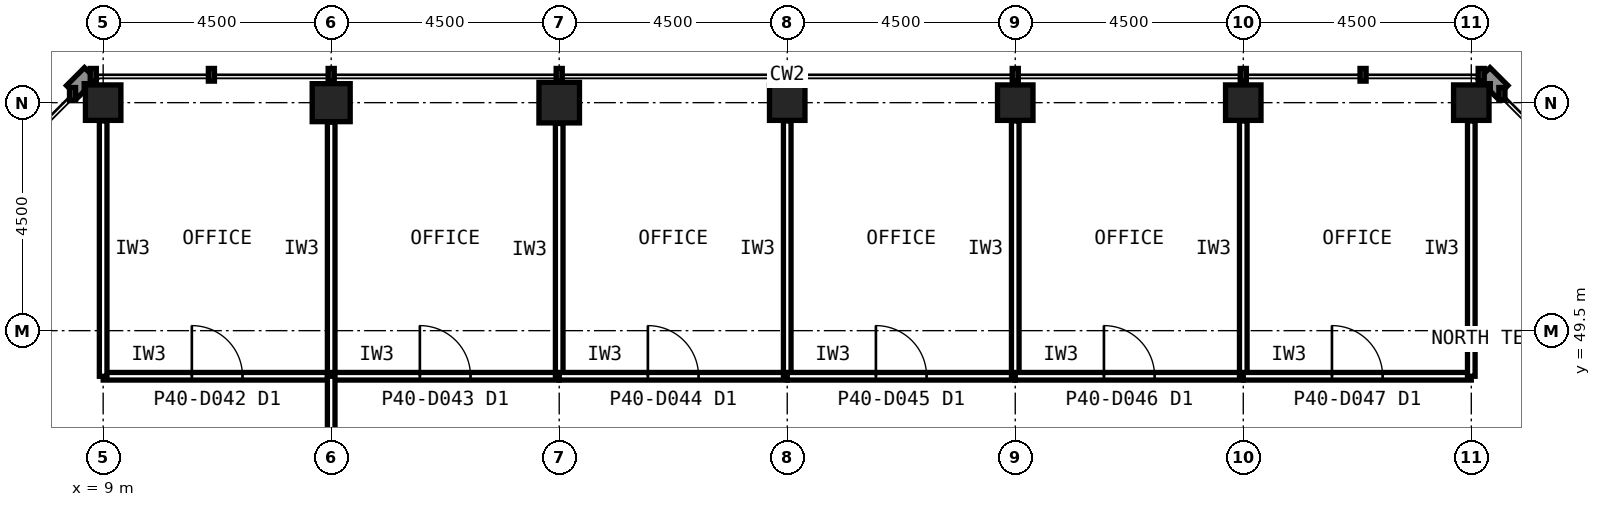
"""IFC4 building model, lengths in metres.
Left out: names, types, materials, properties, quantities, classifications, styles, units other than length and angle.
Written with IfcOpenShell. Run it as: python <this file> out.ifc"""

import sys

from ifc_helpers import new_model, si_unit, direction, frame, frame_2d, origin, origin_2d, place, context, subcontext, project, spatial, rectangle, hollow_rectangle, extrude, element, fill, save


model = new_model("IFC4")
c1 = context("Model", 3, precision=1e-05, world=origin(), true_north=direction((0.0, 1.0)))
c2 = subcontext(c1, "Body", "Model", "MODEL_VIEW")
j1 = project(units=[si_unit("LENGTHUNIT", "METRE"), si_unit("PLANEANGLEUNIT", "RADIAN")], contexts=[c1])
p1 = place(None, origin())
s1 = spatial("IfcSite", under=j1, at=p1, CompositionType="ELEMENT")
p2 = place(p1, origin())
s2 = spatial("IfcBuilding", under=s1, at=p2, CompositionType="ELEMENT")
p3 = place(p2, frame((0.0, 0.0, 167.6)))
s3 = spatial("IfcBuildingStorey", under=s2, at=p3, CompositionType="ELEMENT", Elevation=167.6)
for number, where, z_axis, x_axis in (
    (1, (36.0, 54.0, 0.0), (0.0, 0.0, 1.0), (1.0, 0.0, 0.0)),
    (2, (31.5, 54.0, 0.0), (0.0, 0.0, 1.0), (1.0, 0.0, 0.0)),
    (3, (27.0, 54.0, 0.0), (0.0, 0.0, 1.0), (1.0, 0.0, 0.0)),
    (4, (22.5, 54.0, 0.0), (0.0, 0.0, 1.0), (1.0, 0.0, 0.0)),
):
    element("IfcColumn", number, at=place(p3, frame(where, z_axis=z_axis, x_axis=x_axis)), inside=s3, PredefinedType="COLUMN", context=c2, shape_type="SweptSolid", body=[
        extrude(hollow_rectangle(XDim=0.7, YDim=0.7, WallThickness=0.036, at=origin_2d()), origin(), (0.0, 0.0, 1.0), 4.0),
    ])
p4 = place(p3, frame((18.0, 54.0, 0.0), z_axis=(0.0, 0.0, 1.0), x_axis=(1.0, 0.0, 0.0)))
e5 = element("IfcColumn", 5, at=p4, inside=s3, PredefinedType="COLUMN", context=c2, shape_type="SweptSolid", body=[
    extrude(hollow_rectangle(XDim=0.8, YDim=0.8, WallThickness=0.045, at=origin_2d()), origin(), (0.0, 0.0, 1.0), 4.0),
])
p5 = place(p3, frame((13.5, 54.0, 0.0), z_axis=(0.0, 0.0, 1.0), x_axis=(1.0, 0.0, 0.0)))
e6 = element("IfcColumn", 6, at=p5, inside=s3, PredefinedType="COLUMN", context=c2, shape_type="SweptSolid", body=[
    extrude(hollow_rectangle(XDim=0.75, YDim=0.75, WallThickness=0.04, at=origin_2d()), origin(), (0.0, 0.0, 1.0), 4.0),
])
p6 = place(p3, frame((9.0, 54.0, 0.0), z_axis=(0.0, 0.0, 1.0), x_axis=(1.0, 0.0, 0.0)))
e7 = element("IfcColumn", 7, at=p6, inside=s3, PredefinedType="COLUMN", context=c2, shape_type="SweptSolid", body=[
    extrude(hollow_rectangle(XDim=0.7, YDim=0.7, WallThickness=0.036, at=origin_2d()), origin(), (0.0, 0.0, 1.0), 4.0),
])
p7 = place(p3, frame((9.0, 48.6, 0.0), z_axis=(0.0, 0.0, 1.0), x_axis=(1.0, 0.0, 0.0)))
e8 = element("IfcWall", 8, at=p7, inside=s3, PredefinedType="PARTITIONING", context=c2, shape_type="SweptSolid", body=[
    extrude(rectangle(XDim=4.5, YDim=0.15, at=frame_2d((2.25, 0.0))), origin(), (0.0, 0.0, 1.0), 3.84),
])
p8 = place(p7, frame((1.75, 0.0, 0.0)))
e9 = element("IfcOpeningElement", 9, at=p8, cuts=e8, PredefinedType="OPENING", context=c2, shape_type="SweptSolid", body=[
    extrude(rectangle(XDim=1.0, YDim=2.1, at=frame_2d((0.5, 1.05))), frame((0.0, 0.085, 0.0), z_axis=(0.0, -1.0, 0.0), x_axis=(1.0, 0.0, 0.0)), (0.0, 0.0, 1.0), 0.17),
])
p9 = place(p3, frame((13.5, 48.6, 0.0), z_axis=(0.0, 0.0, 1.0), x_axis=(0.0, 1.0, 0.0)))
e10 = element("IfcWall", 10, at=p9, inside=s3, PredefinedType="PARTITIONING", context=c2, shape_type="SweptSolid", body=[
    extrude(rectangle(XDim=5.015, YDim=0.15, at=frame_2d((2.507, 0.0))), origin(), (0.0, 0.0, 1.0), 2.989),
])
p10 = place(p3, frame((9.0, 53.64, 0.0), z_axis=(0.0, 0.0, 1.0), x_axis=(0.0, -1.0, 0.0)))
e11 = element("IfcWall", 11, at=p10, inside=s3, PredefinedType="PARTITIONING", context=c2, shape_type="SweptSolid", body=[
    extrude(rectangle(XDim=5.04, YDim=0.15, at=frame_2d((2.52, 0.0))), origin(), (0.0, 0.0, 1.0), 3.229),
])
p11 = place(p3, frame((13.5, 48.6, 0.0), z_axis=(0.0, 0.0, 1.0), x_axis=(1.0, 0.0, 0.0)))
e12 = element("IfcWall", 12, at=p11, inside=s3, PredefinedType="PARTITIONING", context=c2, shape_type="SweptSolid", body=[
    extrude(rectangle(XDim=4.5, YDim=0.15, at=frame_2d((2.25, 0.0))), origin(), (0.0, 0.0, 1.0), 3.84),
])
p12 = place(p11, frame((1.75, 0.0, 0.0)))
e13 = element("IfcOpeningElement", 13, at=p12, cuts=e12, PredefinedType="OPENING", context=c2, shape_type="SweptSolid", body=[
    extrude(rectangle(XDim=1.0, YDim=2.1, at=frame_2d((0.5, 1.05))), frame((0.0, 0.085, 0.0), z_axis=(0.0, -1.0, 0.0), x_axis=(1.0, 0.0, 0.0)), (0.0, 0.0, 1.0), 0.17),
])
p13 = place(p3, frame((18.0, 48.6, 0.0), z_axis=(0.0, 0.0, 1.0), x_axis=(0.0, 1.0, 0.0)))
e14 = element("IfcWall", 14, at=p13, inside=s3, PredefinedType="PARTITIONING", context=c2, shape_type="SweptSolid", body=[
    extrude(rectangle(XDim=4.99, YDim=0.15, at=frame_2d((2.495, 0.0))), origin(), (0.0, 0.0, 1.0), 2.989),
])
p14 = place(p3, frame((18.0, 48.6, 0.0), z_axis=(0.0, 0.0, 1.0), x_axis=(1.0, 0.0, 0.0)))
e15 = element("IfcWall", 15, at=p14, inside=s3, PredefinedType="PARTITIONING", context=c2, shape_type="SweptSolid", body=[
    extrude(rectangle(XDim=4.5, YDim=0.15, at=frame_2d((2.25, 0.0))), origin(), (0.0, 0.0, 1.0), 3.84),
])
p15 = place(p14, frame((1.75, 0.0, 0.0)))
e16 = element("IfcOpeningElement", 16, at=p15, cuts=e15, PredefinedType="OPENING", context=c2, shape_type="SweptSolid", body=[
    extrude(rectangle(XDim=1.0, YDim=2.1, at=frame_2d((0.5, 1.05))), frame((0.0, 0.085, 0.0), z_axis=(0.0, -1.0, 0.0), x_axis=(1.0, 0.0, 0.0)), (0.0, 0.0, 1.0), 0.17),
])
p16 = place(p3, frame((22.5, 48.6, 0.0), z_axis=(0.0, 0.0, 1.0), x_axis=(0.0, 1.0, 0.0)))
e17 = element("IfcWall", 17, at=p16, inside=s3, PredefinedType="PARTITIONING", context=c2, shape_type="SweptSolid", body=[
    extrude(rectangle(XDim=5.04, YDim=0.15, at=frame_2d((2.52, 0.0))), origin(), (0.0, 0.0, 1.0), 2.989),
])
p17 = place(p3, frame((22.5, 48.6, 0.0), z_axis=(0.0, 0.0, 1.0), x_axis=(1.0, 0.0, 0.0)))
e18 = element("IfcWall", 18, at=p17, inside=s3, PredefinedType="PARTITIONING", context=c2, shape_type="SweptSolid", body=[
    extrude(rectangle(XDim=4.5, YDim=0.15, at=frame_2d((2.25, 0.0))), origin(), (0.0, 0.0, 1.0), 3.84),
])
p18 = place(p17, frame((1.75, 0.0, 0.0)))
e19 = element("IfcOpeningElement", 19, at=p18, cuts=e18, PredefinedType="OPENING", context=c2, shape_type="SweptSolid", body=[
    extrude(rectangle(XDim=1.0, YDim=2.1, at=frame_2d((0.5, 1.05))), frame((0.0, 0.085, 0.0), z_axis=(0.0, -1.0, 0.0), x_axis=(1.0, 0.0, 0.0)), (0.0, 0.0, 1.0), 0.17),
])
p19 = place(p3, frame((27.0, 48.6, 0.0), z_axis=(0.0, 0.0, 1.0), x_axis=(0.0, 1.0, 0.0)))
e20 = element("IfcWall", 20, at=p19, inside=s3, PredefinedType="PARTITIONING", context=c2, shape_type="SweptSolid", body=[
    extrude(rectangle(XDim=5.04, YDim=0.15, at=frame_2d((2.52, 0.0))), origin(), (0.0, 0.0, 1.0), 2.989),
])
p20 = place(p3, frame((27.0, 48.6, 0.0), z_axis=(0.0, 0.0, 1.0), x_axis=(1.0, 0.0, 0.0)))
e21 = element("IfcWall", 21, at=p20, inside=s3, PredefinedType="PARTITIONING", context=c2, shape_type="SweptSolid", body=[
    extrude(rectangle(XDim=4.5, YDim=0.15, at=frame_2d((2.25, 0.0))), origin(), (0.0, 0.0, 1.0), 3.84),
])
p21 = place(p20, frame((1.75, 0.0, 0.0)))
e22 = element("IfcOpeningElement", 22, at=p21, cuts=e21, PredefinedType="OPENING", context=c2, shape_type="SweptSolid", body=[
    extrude(rectangle(XDim=1.0, YDim=2.1, at=frame_2d((0.5, 1.05))), frame((0.0, 0.085, 0.0), z_axis=(0.0, -1.0, 0.0), x_axis=(1.0, 0.0, 0.0)), (0.0, 0.0, 1.0), 0.17),
])
p22 = place(p3, frame((31.5, 48.6, 0.0), z_axis=(0.0, 0.0, 1.0), x_axis=(0.0, 1.0, 0.0)))
e23 = element("IfcWall", 23, at=p22, inside=s3, PredefinedType="PARTITIONING", context=c2, shape_type="SweptSolid", body=[
    extrude(rectangle(XDim=5.04, YDim=0.15, at=frame_2d((2.52, 0.0))), origin(), (0.0, 0.0, 1.0), 2.989),
])
p23 = place(p3, frame((31.5, 48.6, 0.0), z_axis=(0.0, 0.0, 1.0), x_axis=(1.0, 0.0, 0.0)))
e24 = element("IfcWall", 24, at=p23, inside=s3, PredefinedType="PARTITIONING", context=c2, shape_type="SweptSolid", body=[
    extrude(rectangle(XDim=4.5, YDim=0.15, at=frame_2d((2.25, 0.0))), origin(), (0.0, 0.0, 1.0), 3.84),
])
p24 = place(p23, frame((1.75, 0.0, 0.0)))
e25 = element("IfcOpeningElement", 25, at=p24, cuts=e24, PredefinedType="OPENING", context=c2, shape_type="SweptSolid", body=[
    extrude(rectangle(XDim=1.0, YDim=2.1, at=frame_2d((0.5, 1.05))), frame((0.0, 0.085, 0.0), z_axis=(0.0, -1.0, 0.0), x_axis=(1.0, 0.0, 0.0)), (0.0, 0.0, 1.0), 0.17),
])
p25 = place(p3, frame((36.0, 48.6, 0.0), z_axis=(0.0, 0.0, 1.0), x_axis=(0.0, 1.0, 0.0)))
e26 = element("IfcWall", 26, at=p25, inside=s3, PredefinedType="PARTITIONING", context=c2, shape_type="SweptSolid", body=[
    extrude(rectangle(XDim=5.04, YDim=0.15, at=frame_2d((2.52, 0.0))), origin(), (0.0, 0.0, 1.0), 2.989),
])
p26 = place(p3, frame((13.5, 45.3, 0.0), z_axis=(0.0, 0.0, 1.0), x_axis=(0.0, 1.0, 0.0)))
e27 = element("IfcWall", 27, at=p26, inside=s3, PredefinedType="PARTITIONING", context=c2, shape_type="SweptSolid", body=[
    extrude(rectangle(XDim=3.3, YDim=0.15, at=frame_2d((1.65, 0.0))), origin(), (0.0, 0.0, 1.0), 2.989),
])
p27 = place(p26, frame((1.15, 0.0, 0.0)))
e28 = element("IfcOpeningElement", 28, at=p27, cuts=e27, PredefinedType="OPENING", context=c2, shape_type="SweptSolid", body=[
    extrude(rectangle(XDim=1.0, YDim=2.1, at=frame_2d((0.5, 1.05))), frame((0.0, 0.085, 0.0), z_axis=(0.0, -1.0, 0.0), x_axis=(1.0, 0.0, 0.0)), (0.0, 0.0, 1.0), 0.17),
])
p28 = place(p8, origin())
e29 = element("IfcDoor", 29, at=p28, inside=s3, OperationType="SINGLE_SWING_LEFT", PredefinedType="DOOR", context=c2, shape_type="SweptSolid", body=[
    extrude(rectangle(XDim=1.0, YDim=2.1, at=frame_2d((0.5, 1.05))), frame((0.0, 0.025, 0.0), z_axis=(0.0, -1.0, 0.0), x_axis=(1.0, 0.0, 0.0)), (0.0, 0.0, 1.0), 0.05),
])
fill(e9, e29)
p29 = place(p12, origin())
e30 = element("IfcDoor", 30, at=p29, inside=s3, OperationType="SINGLE_SWING_LEFT", PredefinedType="DOOR", context=c2, shape_type="SweptSolid", body=[
    extrude(rectangle(XDim=1.0, YDim=2.1, at=frame_2d((0.5, 1.05))), frame((0.0, 0.025, 0.0), z_axis=(0.0, -1.0, 0.0), x_axis=(1.0, 0.0, 0.0)), (0.0, 0.0, 1.0), 0.05),
])
fill(e13, e30)
p30 = place(p15, origin())
e31 = element("IfcDoor", 31, at=p30, inside=s3, OperationType="SINGLE_SWING_LEFT", PredefinedType="DOOR", context=c2, shape_type="SweptSolid", body=[
    extrude(rectangle(XDim=1.0, YDim=2.1, at=frame_2d((0.5, 1.05))), frame((0.0, 0.025, 0.0), z_axis=(0.0, -1.0, 0.0), x_axis=(1.0, 0.0, 0.0)), (0.0, 0.0, 1.0), 0.05),
])
fill(e16, e31)
p31 = place(p18, origin())
e32 = element("IfcDoor", 32, at=p31, inside=s3, OperationType="SINGLE_SWING_LEFT", PredefinedType="DOOR", context=c2, shape_type="SweptSolid", body=[
    extrude(rectangle(XDim=1.0, YDim=2.1, at=frame_2d((0.5, 1.05))), frame((0.0, 0.025, 0.0), z_axis=(0.0, -1.0, 0.0), x_axis=(1.0, 0.0, 0.0)), (0.0, 0.0, 1.0), 0.05),
])
fill(e19, e32)
p32 = place(p21, origin())
e33 = element("IfcDoor", 33, at=p32, inside=s3, OperationType="SINGLE_SWING_LEFT", PredefinedType="DOOR", context=c2, shape_type="SweptSolid", body=[
    extrude(rectangle(XDim=1.0, YDim=2.1, at=frame_2d((0.5, 1.05))), frame((0.0, 0.025, 0.0), z_axis=(0.0, -1.0, 0.0), x_axis=(1.0, 0.0, 0.0)), (0.0, 0.0, 1.0), 0.05),
])
fill(e22, e33)
p33 = place(p24, origin())
e34 = element("IfcDoor", 34, at=p33, inside=s3, OperationType="SINGLE_SWING_LEFT", PredefinedType="DOOR", context=c2, shape_type="SweptSolid", body=[
    extrude(rectangle(XDim=1.0, YDim=2.1, at=frame_2d((0.5, 1.05))), frame((0.0, 0.025, 0.0), z_axis=(0.0, -1.0, 0.0), x_axis=(1.0, 0.0, 0.0)), (0.0, 0.0, 1.0), 0.05),
])
fill(e25, e34)
save(model, sys.argv[1])
